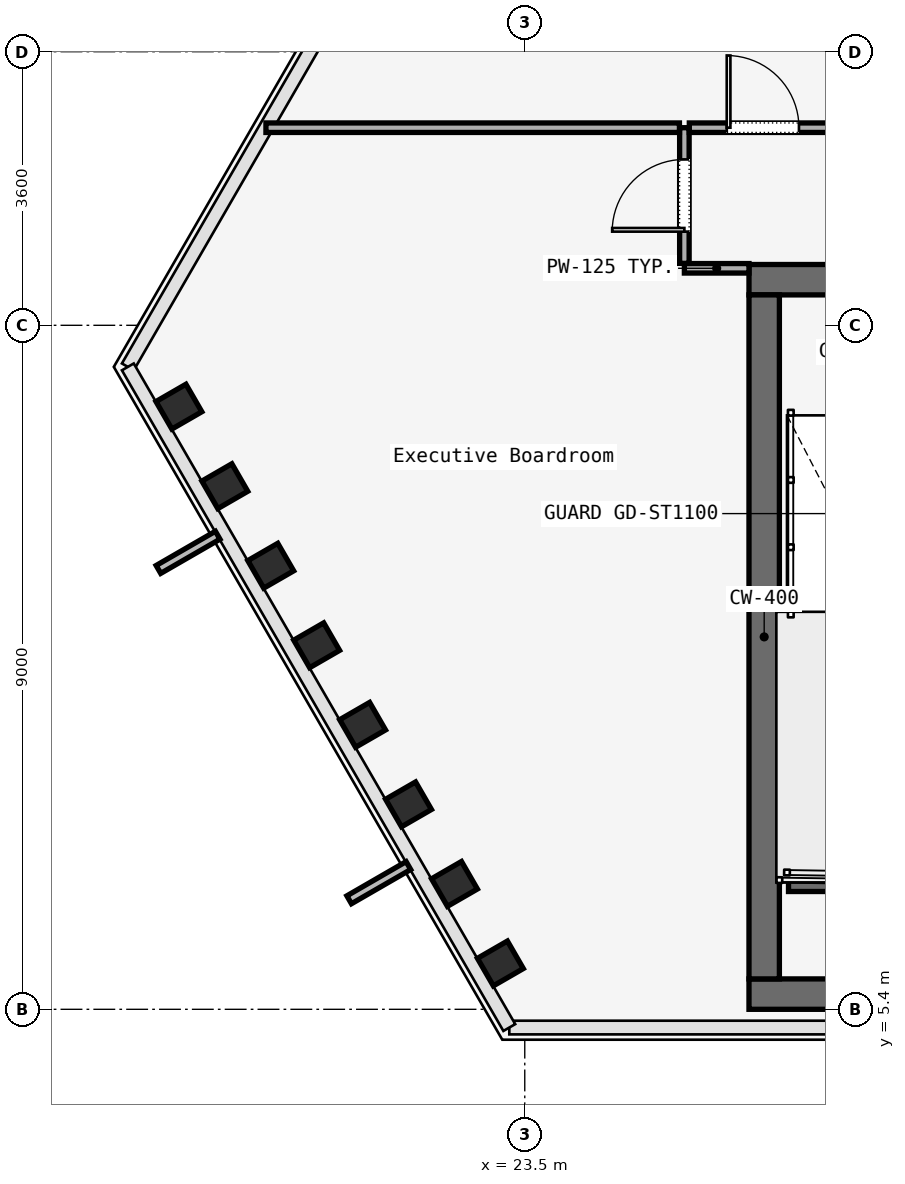
"""IFC4 building model, lengths in metres.
Left out: names, types, materials, properties, quantities, classifications, styles, units other than length and angle.
Written with IfcOpenShell. Run it as: python <this file> out.ifc"""

import sys

from ifc_helpers import new_model, si_unit, direction, frame, frame_2d, origin, origin_2d, place, context, subcontext, project, spatial, rectangle, i_section, extrude, element, fill, save


model = new_model("IFC4")
c1 = context("Model", 3, precision=1e-05, world=origin(), true_north=direction((0.0, 1.0)))
c2 = subcontext(c1, "Body", "Model", "MODEL_VIEW")
j1 = project(units=[si_unit("LENGTHUNIT", "METRE"), si_unit("PLANEANGLEUNIT", "RADIAN")], contexts=[c1])
p1 = place(None, origin())
s1 = spatial("IfcSite", under=j1, at=p1, CompositionType="ELEMENT")
p2 = place(p1, origin())
s2 = spatial("IfcBuilding", under=s1, at=p2, CompositionType="ELEMENT")
p3 = place(p2, frame((0.0, 0.0, 176.4)))
s3 = spatial("IfcBuildingStorey", under=s2, at=p3, CompositionType="ELEMENT", Elevation=176.4)
p4 = place(p3, frame((26.45, 15.0, 0.0), z_axis=(0.0, 0.0, 1.0), x_axis=(1.0, 0.0, 0.0)))
e1 = element("IfcWall", 1, at=p4, inside=s3, PredefinedType="SOLIDWALL", context=c2, shape_type="SweptSolid", body=[
    extrude(rectangle(XDim=31.1, YDim=0.4, at=frame_2d((15.55, 0.0))), origin(), (0.0, 0.0, 1.0), 3.58),
])
p5 = place(p4, frame((1.65, 0.0, 0.0)))
e2 = element("IfcOpeningElement", 2, at=p5, cuts=e1, PredefinedType="OPENING", context=c2, shape_type="SweptSolid", body=[
    extrude(rectangle(XDim=1.1, YDim=2.2, at=frame_2d((0.55, 1.1))), frame((0.0, 0.2, 0.0), z_axis=(0.0, -1.0, 0.0), x_axis=(1.0, 0.0, 0.0)), (0.0, 0.0, 1.0), 0.4),
])
p6 = place(p4, frame((13.65, 0.0, 0.0)))
e3 = element("IfcOpeningElement", 3, at=p6, cuts=e1, PredefinedType="OPENING", context=c2, shape_type="SweptSolid", body=[
    extrude(rectangle(XDim=1.1, YDim=2.2, at=frame_2d((0.55, 1.1))), frame((0.0, 0.2, 0.0), z_axis=(0.0, -1.0, 0.0), x_axis=(1.0, 0.0, 0.0)), (0.0, 0.0, 1.0), 0.4),
])
p7 = place(p4, frame((25.55, 0.0, 0.0)))
e4 = element("IfcOpeningElement", 4, at=p7, cuts=e1, PredefinedType="OPENING", context=c2, shape_type="SweptSolid", body=[
    extrude(rectangle(XDim=1.1, YDim=2.2, at=frame_2d((0.55, 1.1))), frame((0.0, 0.2, 0.0), z_axis=(0.0, -1.0, 0.0), x_axis=(1.0, 0.0, 0.0)), (0.0, 0.0, 1.0), 0.4),
])
p8 = place(p4, frame((10.7, 0.0, 0.0)))
e5 = element("IfcOpeningElement", 5, at=p8, cuts=e1, PredefinedType="OPENING", context=c2, shape_type="SweptSolid", body=[
    extrude(rectangle(XDim=1.4, YDim=2.2, at=frame_2d((0.7, 1.1))), frame((0.0, 0.2, 0.0), z_axis=(0.0, -1.0, 0.0), x_axis=(1.0, 0.0, 0.0)), (0.0, 0.0, 1.0), 0.4),
])
p9 = place(p4, frame((19.35, 0.0, 0.0)))
e6 = element("IfcOpeningElement", 6, at=p9, cuts=e1, PredefinedType="OPENING", context=c2, shape_type="SweptSolid", body=[
    extrude(rectangle(XDim=1.1, YDim=2.2, at=frame_2d((0.55, 1.1))), frame((0.0, 0.2, 0.0), z_axis=(0.0, -1.0, 0.0), x_axis=(1.0, 0.0, 0.0)), (0.0, 0.0, 1.0), 0.4),
])
p10 = place(p4, frame((21.4, 0.0, 0.0)))
e7 = element("IfcOpeningElement", 7, at=p10, cuts=e1, PredefinedType="OPENING", context=c2, shape_type="SweptSolid", body=[
    extrude(rectangle(XDim=0.9, YDim=2.1, at=frame_2d((0.45, 1.05))), frame((0.0, 0.2, 0.0), z_axis=(0.0, -1.0, 0.0), x_axis=(1.0, 0.0, 0.0)), (0.0, 0.0, 1.0), 0.4),
])
p11 = place(p4, frame((23.35, 0.0, 0.0)))
e8 = element("IfcOpeningElement", 8, at=p11, cuts=e1, PredefinedType="OPENING", context=c2, shape_type="SweptSolid", body=[
    extrude(rectangle(XDim=1.3, YDim=2.3, at=frame_2d((0.65, 1.15))), frame((0.0, 0.2, 0.0), z_axis=(0.0, -1.0, 0.0), x_axis=(1.0, 0.0, 0.0)), (0.0, 0.0, 1.0), 0.4),
])
p12 = place(p3, frame((26.45, 5.6, 0.0), z_axis=(0.0, 0.0, 1.0), x_axis=(1.0, 0.0, 0.0)))
e9 = element("IfcWall", 9, at=p12, inside=s3, PredefinedType="SOLIDWALL", context=c2, shape_type="SweptSolid", body=[
    extrude(rectangle(XDim=31.1, YDim=0.4, at=frame_2d((15.55, 0.0))), origin(), (0.0, 0.0, 1.0), 3.58),
])
p13 = place(p3, frame((26.65, 5.8, 0.0), z_axis=(0.0, 0.0, 1.0), x_axis=(0.0, 1.0, 0.0)))
e10 = element("IfcWall", 10, at=p13, inside=s3, PredefinedType="SOLIDWALL", context=c2, shape_type="SweptSolid", body=[
    extrude(rectangle(XDim=9.0, YDim=0.4, at=frame_2d((4.5, 0.0))), origin(), (0.0, 0.0, 1.0), 3.58),
])
for number, where, z_axis, x_axis in (
    (11, (18.949, 13.33, 0.0), (0.0, 0.0, 1.0), (-0.5, 0.866, 0.0)),
    (12, (19.554, 12.283, 0.0), (0.0, 0.0, 1.0), (-0.5, 0.866, 0.0)),
    (13, (20.158, 11.236, 0.0), (0.0, 0.0, 1.0), (-0.5, 0.866, 0.0)),
    (14, (20.762, 10.19, 0.0), (0.0, 0.0, 1.0), (-0.5, 0.866, 0.0)),
    (15, (21.366, 9.143, 0.0), (0.0, 0.0, 1.0), (-0.5, 0.866, 0.0)),
    (16, (21.971, 8.096, 0.0), (0.0, 0.0, 1.0), (-0.5, 0.866, 0.0)),
    (17, (22.575, 7.05, 0.0), (0.0, 0.0, 1.0), (-0.5, 0.866, 0.0)),
    (18, (23.179, 6.003, 0.0), (0.0, 0.0, 1.0), (-0.5, 0.866, 0.0)),
):
    element("IfcColumn", number, at=place(p3, frame(where, z_axis=z_axis, x_axis=x_axis)), inside=s3, PredefinedType="COLUMN", context=c2, shape_type="SweptSolid", body=[
        extrude(i_section(OverallWidth=0.418, OverallDepth=0.455, WebThickness=0.042, FlangeThickness=0.052, FilletRadius=0.015, at=origin_2d()), origin(), (0.0, 0.0, 1.0), 3.58),
    ])
p14 = place(p3, frame((26.97, 7.05, 0.0), z_axis=(0.0, 0.0, 1.0), x_axis=(1.0, 0.0, 0.0)))
e19 = element("IfcWall", 19, at=p14, inside=s3, PredefinedType="SOLIDWALL", context=c2, shape_type="SweptSolid", body=[
    extrude(rectangle(XDim=3.115, YDim=0.2, at=frame_2d((1.558, 0.0))), origin(), (0.0, 0.0, 1.0), 3.8),
])
p15 = place(p3, frame((26.45, 15.15, 0.0), z_axis=(0.0, 0.0, 1.0), x_axis=(-1.0, 0.0, 0.0)))
e20 = element("IfcWall", 20, at=p15, inside=s3, PredefinedType="PARTITIONING", context=c2, shape_type="SweptSolid", body=[
    extrude(rectangle(XDim=0.85, YDim=0.125, at=frame_2d((0.425, 0.0))), origin(), (0.0, 0.0, 1.0), 3.01),
])
p16 = place(p3, frame((25.6, 15.215, 0.0), z_axis=(0.0, 0.0, 1.0), x_axis=(0.0, 1.0, 0.0)))
e21 = element("IfcWall", 21, at=p16, inside=s3, PredefinedType="PARTITIONING", context=c2, shape_type="SweptSolid", body=[
    extrude(rectangle(XDim=1.785, YDim=0.125, at=frame_2d((0.893, 0.0))), origin(), (0.0, 0.0, 1.0), 3.01),
])
p17 = place(p16, frame((0.417, 0.0, 0.0)))
e22 = element("IfcOpeningElement", 22, at=p17, cuts=e21, PredefinedType="OPENING", context=c2, shape_type="SweptSolid", body=[
    extrude(rectangle(XDim=0.95, YDim=2.2, at=frame_2d((0.475, 1.1))), frame((0.0, 0.062, 0.0), z_axis=(0.0, -1.0, 0.0), x_axis=(1.0, 0.0, 0.0)), (0.0, 0.0, 1.0), 0.125),
])
p18 = place(p3, frame((25.665, 17.0, 0.0), z_axis=(0.0, 0.0, 1.0), x_axis=(1.0, 0.0, 0.0)))
e23 = element("IfcWall", 23, at=p18, inside=s3, PredefinedType="PARTITIONING", context=c2, shape_type="SweptSolid", body=[
    extrude(rectangle(XDim=1.935, YDim=0.125, at=frame_2d((0.968, 0.0))), origin(), (0.0, 0.0, 1.0), 3.01),
])
p19 = place(p18, frame((0.492, 0.0, 0.0)))
e24 = element("IfcOpeningElement", 24, at=p19, cuts=e23, PredefinedType="OPENING", context=c2, shape_type="SweptSolid", body=[
    extrude(rectangle(XDim=0.95, YDim=2.2, at=frame_2d((0.475, 1.1))), frame((0.0, 0.062, 0.0), z_axis=(0.0, -1.0, 0.0), x_axis=(1.0, 0.0, 0.0)), (0.0, 0.0, 1.0), 0.125),
])
p20 = place(p3, frame((20.095, 17.0, 0.0), z_axis=(0.0, 0.0, 1.0), x_axis=(1.0, 0.0, 0.0)))
e25 = element("IfcWall", 25, at=p20, inside=s3, PredefinedType="PARTITIONING", context=c2, shape_type="SweptSolid", body=[
    extrude(rectangle(XDim=5.44, YDim=0.125, at=frame_2d((2.72, 0.0))), origin(), (0.0, 0.0, 1.0), 3.01),
])
p21 = place(p17, origin())
e26 = element("IfcDoor", 26, at=p21, inside=s3, OperationType="SINGLE_SWING_LEFT", PredefinedType="DOOR", context=c2, shape_type="SweptSolid", body=[
    extrude(rectangle(XDim=0.95, YDim=2.2, at=frame_2d((0.475, 1.1))), frame((0.0, 0.025, 0.0), z_axis=(0.0, -1.0, 0.0), x_axis=(1.0, 0.0, 0.0)), (0.0, 0.0, 1.0), 0.05),
])
fill(e22, e26)
p22 = place(p19, origin())
e27 = element("IfcDoor", 27, at=p22, inside=s3, OperationType="SINGLE_SWING_RIGHT", PredefinedType="DOOR", context=c2, shape_type="SweptSolid", body=[
    extrude(rectangle(XDim=0.95, YDim=2.2, at=frame_2d((0.475, 1.1))), frame((0.0, 0.025, 0.0), z_axis=(0.0, -1.0, 0.0), x_axis=(1.0, 0.0, 0.0)), (0.0, 0.0, 1.0), 0.05),
])
fill(e24, e27)
save(model, sys.argv[1])
